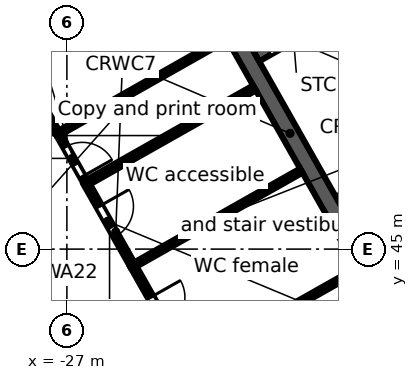
"""IFC4 building model, lengths in metres.
Left out: names, types, materials, properties, quantities, classifications, styles, units other than length and angle.
Written with IfcOpenShell. Run it as: python <this file> out.ifc"""

import sys

from ifc_helpers import new_model, si_unit, direction, frame, frame_2d, origin, place, context, subcontext, project, spatial, rectangle, extrude, element, fill, save


model = new_model("IFC4")
c1 = context("Model", 3, precision=1e-05, world=origin(), true_north=direction((0.0, 1.0)))
c2 = subcontext(c1, "Body", "Model", "MODEL_VIEW")
j1 = project(units=[si_unit("LENGTHUNIT", "METRE"), si_unit("PLANEANGLEUNIT", "RADIAN")], contexts=[c1])
p1 = place(None, origin())
s1 = spatial("IfcSite", under=j1, at=p1, CompositionType="ELEMENT")
p2 = place(p1, origin())
s2 = spatial("IfcBuilding", under=s1, at=p2, CompositionType="ELEMENT")
p3 = place(p2, frame((0.0, 0.0, 223.1)))
s3 = spatial("IfcBuildingStorey", under=s2, at=p3, CompositionType="ELEMENT", Elevation=223.1)
p4 = place(p3, frame((-0.046, 47.974, 0.0), z_axis=(0.0, 0.0, 1.0), x_axis=(-0.870356579543, -0.492421998337, 0.0)))
e1 = element("IfcWall", 1, at=p4, inside=s3, PredefinedType="STANDARD", context=c2, shape_type="SweptSolid", body=[
    extrude(rectangle(XDim=43.754, YDim=0.25, at=frame_2d((21.877, 0.0))), origin(), (0.0, 0.0, 1.0), 3.62),
])
p5 = place(p4, frame((41.061, 0.0, 0.8)))
e2 = element("IfcOpeningElement", 2, at=p5, cuts=e1, PredefinedType="OPENING", context=c2, shape_type="SweptSolid", body=[
    extrude(rectangle(XDim=2.4, YDim=2.2, at=frame_2d((1.2, 1.1))), frame((0.0, 0.135, 0.0), z_axis=(0.0, -1.0, 0.0), x_axis=(1.0, 0.0, 0.0)), (0.0, 0.0, 1.0), 0.27),
])
p6 = place(p4, frame((38.443, 0.0, 0.0)))
e3 = element("IfcOpeningElement", 3, at=p6, cuts=e1, PredefinedType="OPENING", context=c2, shape_type="SweptSolid", body=[
    extrude(rectangle(XDim=1.8, YDim=2.4, at=frame_2d((0.9, 1.2))), frame((0.0, 0.135, 0.0), z_axis=(0.0, -1.0, 0.0), x_axis=(1.0, 0.0, 0.0)), (0.0, 0.0, 1.0), 0.27),
])
p7 = place(p4, frame((35.225, 0.0, 0.8)))
e4 = element("IfcOpeningElement", 4, at=p7, cuts=e1, PredefinedType="OPENING", context=c2, shape_type="SweptSolid", body=[
    extrude(rectangle(XDim=2.4, YDim=2.2, at=frame_2d((1.2, 1.1))), frame((0.0, 0.135, 0.0), z_axis=(0.0, -1.0, 0.0), x_axis=(1.0, 0.0, 0.0)), (0.0, 0.0, 1.0), 0.27),
])
p8 = place(p4, frame((32.307, 0.0, 0.8)))
e5 = element("IfcOpeningElement", 5, at=p8, cuts=e1, PredefinedType="OPENING", context=c2, shape_type="SweptSolid", body=[
    extrude(rectangle(XDim=2.4, YDim=2.2, at=frame_2d((1.2, 1.1))), frame((0.0, 0.135, 0.0), z_axis=(0.0, -1.0, 0.0), x_axis=(1.0, 0.0, 0.0)), (0.0, 0.0, 1.0), 0.27),
])
p9 = place(p4, frame((29.688, 0.0, 0.0)))
e6 = element("IfcOpeningElement", 6, at=p9, cuts=e1, PredefinedType="OPENING", context=c2, shape_type="SweptSolid", body=[
    extrude(rectangle(XDim=1.8, YDim=2.4, at=frame_2d((0.9, 1.2))), frame((0.0, 0.135, 0.0), z_axis=(0.0, -1.0, 0.0), x_axis=(1.0, 0.0, 0.0)), (0.0, 0.0, 1.0), 0.27),
])
p10 = place(p4, frame((26.47, 0.0, 0.8)))
e7 = element("IfcOpeningElement", 7, at=p10, cuts=e1, PredefinedType="OPENING", context=c2, shape_type="SweptSolid", body=[
    extrude(rectangle(XDim=2.4, YDim=2.2, at=frame_2d((1.2, 1.1))), frame((0.0, 0.135, 0.0), z_axis=(0.0, -1.0, 0.0), x_axis=(1.0, 0.0, 0.0)), (0.0, 0.0, 1.0), 0.27),
])
p11 = place(p4, frame((23.552, 0.0, 0.8)))
e8 = element("IfcOpeningElement", 8, at=p11, cuts=e1, PredefinedType="OPENING", context=c2, shape_type="SweptSolid", body=[
    extrude(rectangle(XDim=2.4, YDim=2.2, at=frame_2d((1.2, 1.1))), frame((0.0, 0.135, 0.0), z_axis=(0.0, -1.0, 0.0), x_axis=(1.0, 0.0, 0.0)), (0.0, 0.0, 1.0), 0.27),
])
p12 = place(p4, frame((20.934, 0.0, 0.0)))
e9 = element("IfcOpeningElement", 9, at=p12, cuts=e1, PredefinedType="OPENING", context=c2, shape_type="SweptSolid", body=[
    extrude(rectangle(XDim=1.8, YDim=2.4, at=frame_2d((0.9, 1.2))), frame((0.0, 0.135, 0.0), z_axis=(0.0, -1.0, 0.0), x_axis=(1.0, 0.0, 0.0)), (0.0, 0.0, 1.0), 0.27),
])
p13 = place(p4, frame((17.716, 0.0, 0.8)))
e10 = element("IfcOpeningElement", 10, at=p13, cuts=e1, PredefinedType="OPENING", context=c2, shape_type="SweptSolid", body=[
    extrude(rectangle(XDim=2.4, YDim=2.2, at=frame_2d((1.2, 1.1))), frame((0.0, 0.135, 0.0), z_axis=(0.0, -1.0, 0.0), x_axis=(1.0, 0.0, 0.0)), (0.0, 0.0, 1.0), 0.27),
])
p14 = place(p4, frame((14.798, 0.0, 0.8)))
e11 = element("IfcOpeningElement", 11, at=p14, cuts=e1, PredefinedType="OPENING", context=c2, shape_type="SweptSolid", body=[
    extrude(rectangle(XDim=2.4, YDim=2.2, at=frame_2d((1.2, 1.1))), frame((0.0, 0.135, 0.0), z_axis=(0.0, -1.0, 0.0), x_axis=(1.0, 0.0, 0.0)), (0.0, 0.0, 1.0), 0.27),
])
p15 = place(p4, frame((12.179, 0.0, 0.0)))
e12 = element("IfcOpeningElement", 12, at=p15, cuts=e1, PredefinedType="OPENING", context=c2, shape_type="SweptSolid", body=[
    extrude(rectangle(XDim=1.8, YDim=2.4, at=frame_2d((0.9, 1.2))), frame((0.0, 0.135, 0.0), z_axis=(0.0, -1.0, 0.0), x_axis=(1.0, 0.0, 0.0)), (0.0, 0.0, 1.0), 0.27),
])
p16 = place(p4, frame((8.961, 0.0, 0.8)))
e13 = element("IfcOpeningElement", 13, at=p16, cuts=e1, PredefinedType="OPENING", context=c2, shape_type="SweptSolid", body=[
    extrude(rectangle(XDim=2.4, YDim=2.2, at=frame_2d((1.2, 1.1))), frame((0.0, 0.135, 0.0), z_axis=(0.0, -1.0, 0.0), x_axis=(1.0, 0.0, 0.0)), (0.0, 0.0, 1.0), 0.27),
])
p17 = place(p4, frame((6.043, 0.0, 0.8)))
e14 = element("IfcOpeningElement", 14, at=p17, cuts=e1, PredefinedType="OPENING", context=c2, shape_type="SweptSolid", body=[
    extrude(rectangle(XDim=2.4, YDim=2.2, at=frame_2d((1.2, 1.1))), frame((0.0, 0.135, 0.0), z_axis=(0.0, -1.0, 0.0), x_axis=(1.0, 0.0, 0.0)), (0.0, 0.0, 1.0), 0.27),
])
p18 = place(p4, frame((3.425, 0.0, 0.0)))
e15 = element("IfcOpeningElement", 15, at=p18, cuts=e1, PredefinedType="OPENING", context=c2, shape_type="SweptSolid", body=[
    extrude(rectangle(XDim=1.8, YDim=2.4, at=frame_2d((0.9, 1.2))), frame((0.0, 0.135, 0.0), z_axis=(0.0, -1.0, 0.0), x_axis=(1.0, 0.0, 0.0)), (0.0, 0.0, 1.0), 0.27),
])
p19 = place(p4, frame((0.207, 0.0, 0.8)))
e16 = element("IfcOpeningElement", 16, at=p19, cuts=e1, PredefinedType="OPENING", context=c2, shape_type="SweptSolid", body=[
    extrude(rectangle(XDim=2.4, YDim=2.2, at=frame_2d((1.2, 1.1))), frame((0.0, 0.135, 0.0), z_axis=(0.0, -1.0, 0.0), x_axis=(1.0, 0.0, 0.0)), (0.0, 0.0, 1.0), 0.27),
])
p20 = place(p3, frame((-58.732, 38.771, 0.0), z_axis=(0.0, 0.0, 1.0), x_axis=(0.870354824205, 0.492425100887, 0.0)))
e17 = element("IfcWall", 17, at=p20, inside=s3, PredefinedType="STANDARD", context=c2, shape_type="SweptSolid", body=[
    extrude(rectangle(XDim=64.006, YDim=0.25, at=frame_2d((32.003, 0.0))), origin(), (0.0, 0.0, 1.0), 3.62),
])
p21 = place(p20, frame((61.259, 0.0, 0.8)))
e18 = element("IfcOpeningElement", 18, at=p21, cuts=e17, PredefinedType="OPENING", context=c2, shape_type="SweptSolid", body=[
    extrude(rectangle(XDim=2.4, YDim=2.2, at=frame_2d((1.2, 1.1))), frame((0.0, 0.135, 0.0), z_axis=(0.0, -1.0, 0.0), x_axis=(1.0, 0.0, 0.0)), (0.0, 0.0, 1.0), 0.27),
])
p22 = place(p20, frame((58.216, 0.0, 0.8)))
e19 = element("IfcOpeningElement", 19, at=p22, cuts=e17, PredefinedType="OPENING", context=c2, shape_type="SweptSolid", body=[
    extrude(rectangle(XDim=2.4, YDim=2.2, at=frame_2d((1.2, 1.1))), frame((0.0, 0.135, 0.0), z_axis=(0.0, -1.0, 0.0), x_axis=(1.0, 0.0, 0.0)), (0.0, 0.0, 1.0), 0.27),
])
p23 = place(p20, frame((55.173, 0.0, 0.8)))
e20 = element("IfcOpeningElement", 20, at=p23, cuts=e17, PredefinedType="OPENING", context=c2, shape_type="SweptSolid", body=[
    extrude(rectangle(XDim=2.4, YDim=2.2, at=frame_2d((1.2, 1.1))), frame((0.0, 0.135, 0.0), z_axis=(0.0, -1.0, 0.0), x_axis=(1.0, 0.0, 0.0)), (0.0, 0.0, 1.0), 0.27),
])
p24 = place(p20, frame((52.129, 0.0, 0.8)))
e21 = element("IfcOpeningElement", 21, at=p24, cuts=e17, PredefinedType="OPENING", context=c2, shape_type="SweptSolid", body=[
    extrude(rectangle(XDim=2.4, YDim=2.2, at=frame_2d((1.2, 1.1))), frame((0.0, 0.135, 0.0), z_axis=(0.0, -1.0, 0.0), x_axis=(1.0, 0.0, 0.0)), (0.0, 0.0, 1.0), 0.27),
])
p25 = place(p20, frame((49.086, 0.0, 0.8)))
e22 = element("IfcOpeningElement", 22, at=p25, cuts=e17, PredefinedType="OPENING", context=c2, shape_type="SweptSolid", body=[
    extrude(rectangle(XDim=2.4, YDim=2.2, at=frame_2d((1.2, 1.1))), frame((0.0, 0.135, 0.0), z_axis=(0.0, -1.0, 0.0), x_axis=(1.0, 0.0, 0.0)), (0.0, 0.0, 1.0), 0.27),
])
p26 = place(p20, frame((46.043, 0.0, 0.8)))
e23 = element("IfcOpeningElement", 23, at=p26, cuts=e17, PredefinedType="OPENING", context=c2, shape_type="SweptSolid", body=[
    extrude(rectangle(XDim=2.4, YDim=2.2, at=frame_2d((1.2, 1.1))), frame((0.0, 0.135, 0.0), z_axis=(0.0, -1.0, 0.0), x_axis=(1.0, 0.0, 0.0)), (0.0, 0.0, 1.0), 0.27),
])
p27 = place(p20, frame((43.0, 0.0, 0.8)))
e24 = element("IfcOpeningElement", 24, at=p27, cuts=e17, PredefinedType="OPENING", context=c2, shape_type="SweptSolid", body=[
    extrude(rectangle(XDim=2.4, YDim=2.2, at=frame_2d((1.2, 1.1))), frame((0.0, 0.135, 0.0), z_axis=(0.0, -1.0, 0.0), x_axis=(1.0, 0.0, 0.0)), (0.0, 0.0, 1.0), 0.27),
])
p28 = place(p20, frame((39.956, 0.0, 0.8)))
e25 = element("IfcOpeningElement", 25, at=p28, cuts=e17, PredefinedType="OPENING", context=c2, shape_type="SweptSolid", body=[
    extrude(rectangle(XDim=2.4, YDim=2.2, at=frame_2d((1.2, 1.1))), frame((0.0, 0.135, 0.0), z_axis=(0.0, -1.0, 0.0), x_axis=(1.0, 0.0, 0.0)), (0.0, 0.0, 1.0), 0.27),
])
p29 = place(p20, frame((36.913, 0.0, 0.8)))
e26 = element("IfcOpeningElement", 26, at=p29, cuts=e17, PredefinedType="OPENING", context=c2, shape_type="SweptSolid", body=[
    extrude(rectangle(XDim=2.4, YDim=2.2, at=frame_2d((1.2, 1.1))), frame((0.0, 0.135, 0.0), z_axis=(0.0, -1.0, 0.0), x_axis=(1.0, 0.0, 0.0)), (0.0, 0.0, 1.0), 0.27),
])
p30 = place(p20, frame((33.87, 0.0, 0.8)))
e27 = element("IfcOpeningElement", 27, at=p30, cuts=e17, PredefinedType="OPENING", context=c2, shape_type="SweptSolid", body=[
    extrude(rectangle(XDim=2.4, YDim=2.2, at=frame_2d((1.2, 1.1))), frame((0.0, 0.135, 0.0), z_axis=(0.0, -1.0, 0.0), x_axis=(1.0, 0.0, 0.0)), (0.0, 0.0, 1.0), 0.27),
])
p31 = place(p20, frame((30.826, 0.0, 0.8)))
e28 = element("IfcOpeningElement", 28, at=p31, cuts=e17, PredefinedType="OPENING", context=c2, shape_type="SweptSolid", body=[
    extrude(rectangle(XDim=2.4, YDim=2.2, at=frame_2d((1.2, 1.1))), frame((0.0, 0.135, 0.0), z_axis=(0.0, -1.0, 0.0), x_axis=(1.0, 0.0, 0.0)), (0.0, 0.0, 1.0), 0.27),
])
p32 = place(p20, frame((27.783, 0.0, 0.8)))
e29 = element("IfcOpeningElement", 29, at=p32, cuts=e17, PredefinedType="OPENING", context=c2, shape_type="SweptSolid", body=[
    extrude(rectangle(XDim=2.4, YDim=2.2, at=frame_2d((1.2, 1.1))), frame((0.0, 0.135, 0.0), z_axis=(0.0, -1.0, 0.0), x_axis=(1.0, 0.0, 0.0)), (0.0, 0.0, 1.0), 0.27),
])
p33 = place(p20, frame((24.74, 0.0, 0.8)))
e30 = element("IfcOpeningElement", 30, at=p33, cuts=e17, PredefinedType="OPENING", context=c2, shape_type="SweptSolid", body=[
    extrude(rectangle(XDim=2.4, YDim=2.2, at=frame_2d((1.2, 1.1))), frame((0.0, 0.135, 0.0), z_axis=(0.0, -1.0, 0.0), x_axis=(1.0, 0.0, 0.0)), (0.0, 0.0, 1.0), 0.27),
])
p34 = place(p20, frame((21.696, 0.0, 0.8)))
e31 = element("IfcOpeningElement", 31, at=p34, cuts=e17, PredefinedType="OPENING", context=c2, shape_type="SweptSolid", body=[
    extrude(rectangle(XDim=2.4, YDim=2.2, at=frame_2d((1.2, 1.1))), frame((0.0, 0.135, 0.0), z_axis=(0.0, -1.0, 0.0), x_axis=(1.0, 0.0, 0.0)), (0.0, 0.0, 1.0), 0.27),
])
p35 = place(p20, frame((18.653, 0.0, 0.8)))
e32 = element("IfcOpeningElement", 32, at=p35, cuts=e17, PredefinedType="OPENING", context=c2, shape_type="SweptSolid", body=[
    extrude(rectangle(XDim=2.4, YDim=2.2, at=frame_2d((1.2, 1.1))), frame((0.0, 0.135, 0.0), z_axis=(0.0, -1.0, 0.0), x_axis=(1.0, 0.0, 0.0)), (0.0, 0.0, 1.0), 0.27),
])
p36 = place(p20, frame((15.61, 0.0, 0.8)))
e33 = element("IfcOpeningElement", 33, at=p36, cuts=e17, PredefinedType="OPENING", context=c2, shape_type="SweptSolid", body=[
    extrude(rectangle(XDim=2.4, YDim=2.2, at=frame_2d((1.2, 1.1))), frame((0.0, 0.135, 0.0), z_axis=(0.0, -1.0, 0.0), x_axis=(1.0, 0.0, 0.0)), (0.0, 0.0, 1.0), 0.27),
])
p37 = place(p20, frame((12.567, 0.0, 0.8)))
e34 = element("IfcOpeningElement", 34, at=p37, cuts=e17, PredefinedType="OPENING", context=c2, shape_type="SweptSolid", body=[
    extrude(rectangle(XDim=2.4, YDim=2.2, at=frame_2d((1.2, 1.1))), frame((0.0, 0.135, 0.0), z_axis=(0.0, -1.0, 0.0), x_axis=(1.0, 0.0, 0.0)), (0.0, 0.0, 1.0), 0.27),
])
p38 = place(p20, frame((9.523, 0.0, 0.8)))
e35 = element("IfcOpeningElement", 35, at=p38, cuts=e17, PredefinedType="OPENING", context=c2, shape_type="SweptSolid", body=[
    extrude(rectangle(XDim=2.4, YDim=2.2, at=frame_2d((1.2, 1.1))), frame((0.0, 0.135, 0.0), z_axis=(0.0, -1.0, 0.0), x_axis=(1.0, 0.0, 0.0)), (0.0, 0.0, 1.0), 0.27),
])
p39 = place(p20, frame((6.48, 0.0, 0.8)))
e36 = element("IfcOpeningElement", 36, at=p39, cuts=e17, PredefinedType="OPENING", context=c2, shape_type="SweptSolid", body=[
    extrude(rectangle(XDim=2.4, YDim=2.2, at=frame_2d((1.2, 1.1))), frame((0.0, 0.135, 0.0), z_axis=(0.0, -1.0, 0.0), x_axis=(1.0, 0.0, 0.0)), (0.0, 0.0, 1.0), 0.27),
])
p40 = place(p20, frame((3.437, 0.0, 0.8)))
e37 = element("IfcOpeningElement", 37, at=p40, cuts=e17, PredefinedType="OPENING", context=c2, shape_type="SweptSolid", body=[
    extrude(rectangle(XDim=2.4, YDim=2.2, at=frame_2d((1.2, 1.1))), frame((0.0, 0.135, 0.0), z_axis=(0.0, -1.0, 0.0), x_axis=(1.0, 0.0, 0.0)), (0.0, 0.0, 1.0), 0.27),
])
p41 = place(p20, frame((0.393, 0.0, 0.8)))
e38 = element("IfcOpeningElement", 38, at=p41, cuts=e17, PredefinedType="OPENING", context=c2, shape_type="SweptSolid", body=[
    extrude(rectangle(XDim=2.4, YDim=2.2, at=frame_2d((1.2, 1.1))), frame((0.0, 0.135, 0.0), z_axis=(0.0, -1.0, 0.0), x_axis=(1.0, 0.0, 0.0)), (0.0, 0.0, 1.0), 0.27),
])
p42 = place(p3, frame((-31.787, 49.542, 0.0), z_axis=(0.0, 0.0, 1.0), x_axis=(0.492421378713, -0.870356930107, 0.0)))
e39 = element("IfcWall", 39, at=p42, inside=s3, PredefinedType="SOLIDWALL", context=c2, shape_type="SweptSolid", body=[
    extrude(rectangle(XDim=13.1, YDim=0.45, at=frame_2d((6.55, 0.0))), origin(), (0.0, 0.0, 1.0), 3.62),
])
p43 = place(p3, frame((-19.849, 46.242, 0.0), z_axis=(0.0, 0.0, 1.0), x_axis=(0.870347559728, 0.492437940532, 0.0)))
e40 = element("IfcWall", 40, at=p43, inside=s3, PredefinedType="SOLIDWALL", context=c2, shape_type="SweptSolid", body=[
    extrude(rectangle(XDim=5.05, YDim=0.3, at=frame_2d((2.525, 0.0))), origin(), (0.0, 0.0, 1.0), 3.62),
])
p44 = place(p43, frame((0.7, 0.0, 0.0)))
e41 = element("IfcOpeningElement", 41, at=p44, cuts=e40, PredefinedType="OPENING", context=c2, shape_type="SweptSolid", body=[
    extrude(rectangle(XDim=1.1, YDim=2.1, at=frame_2d((0.55, 1.05))), frame((0.0, 0.16, 0.0), z_axis=(0.0, -1.0, 0.0), x_axis=(1.0, 0.0, 0.0)), (0.0, 0.0, 1.0), 0.32),
])
p45 = place(p43, frame((3.8, 0.0, 0.0)))
e42 = element("IfcOpeningElement", 42, at=p45, cuts=e40, PredefinedType="OPENING", context=c2, shape_type="SweptSolid", body=[
    extrude(rectangle(XDim=0.9, YDim=2.1, at=frame_2d((0.45, 1.05))), frame((0.0, 0.16, 0.0), z_axis=(0.0, -1.0, 0.0), x_axis=(1.0, 0.0, 0.0)), (0.0, 0.0, 1.0), 0.32),
])
p46 = place(p3, frame((-22.015, 50.072, 0.0), z_axis=(0.0, 0.0, 1.0), x_axis=(0.870354900257, 0.492424966466, 0.0)))
e43 = element("IfcWall", 43, at=p46, inside=s3, PredefinedType="SOLIDWALL", context=c2, shape_type="SweptSolid", body=[
    extrude(rectangle(XDim=7.35, YDim=0.3, at=frame_2d((3.675, 0.0))), origin(), (0.0, 0.0, 1.0), 3.62),
])
p47 = place(p46, frame((0.35, 0.0, 0.0)))
e44 = element("IfcOpeningElement", 44, at=p47, cuts=e43, PredefinedType="OPENING", context=c2, shape_type="SweptSolid", body=[
    extrude(rectangle(XDim=1.0, YDim=2.1, at=frame_2d((0.5, 1.05))), frame((0.0, 0.16, 0.0), z_axis=(0.0, -1.0, 0.0), x_axis=(1.0, 0.0, 0.0)), (0.0, 0.0, 1.0), 0.32),
])
p48 = place(p3, frame((-24.353, 53.747, 0.0), z_axis=(0.0, 0.0, 1.0), x_axis=(0.492435496286, -0.870348942665, 0.0)))
e45 = element("IfcWall", 45, at=p48, inside=s3, PredefinedType="SOLIDWALL", context=c2, shape_type="SweptSolid", body=[
    extrude(rectangle(XDim=13.1, YDim=0.45, at=frame_2d((6.55, 0.0))), origin(), (0.0, 0.0, 1.0), 3.62),
])
p49 = place(p3, frame((-29.201, 51.521, 0.0), z_axis=(0.0, 0.0, 1.0), x_axis=(0.492340861121, -0.870402479587, 0.0)))
e46 = element("IfcWall", 46, at=p49, inside=s3, PredefinedType="PARTITIONING", context=c2, shape_type="SweptSolid", body=[
    extrude(rectangle(XDim=3.999, YDim=0.125, at=frame_2d((2.0, 0.0))), origin(), (0.0, 0.0, 1.0), 3.62),
])
p50 = place(p49, frame((1.45, 0.0, 0.0)))
e47 = element("IfcOpeningElement", 47, at=p50, cuts=e46, PredefinedType="OPENING", context=c2, shape_type="SweptSolid", body=[
    extrude(rectangle(XDim=0.9, YDim=2.1, at=frame_2d((0.45, 1.05))), frame((0.0, 0.073, 0.0), z_axis=(0.0, -1.0, 0.0), x_axis=(1.0, 0.0, 0.0)), (0.0, 0.0, 1.0), 0.145),
])
p51 = place(p3, frame((-27.232, 48.04, 0.0), z_axis=(0.0, 0.0, 1.0), x_axis=(0.492437810475, -0.870347633314, 0.0)))
e48 = element("IfcWall", 48, at=p51, inside=s3, PredefinedType="PARTITIONING", context=c2, shape_type="SweptSolid", body=[
    extrude(rectangle(XDim=1.501, YDim=0.125, at=frame_2d((0.75, 0.0))), origin(), (0.0, 0.0, 1.0), 3.62),
])
p52 = place(p51, frame((0.4, 0.0, 0.0)))
e49 = element("IfcOpeningElement", 49, at=p52, cuts=e48, PredefinedType="OPENING", context=c2, shape_type="SweptSolid", body=[
    extrude(rectangle(XDim=0.9, YDim=2.1, at=frame_2d((0.45, 1.05))), frame((0.0, 0.073, 0.0), z_axis=(0.0, -1.0, 0.0), x_axis=(1.0, 0.0, 0.0)), (0.0, 0.0, 1.0), 0.145),
])
p53 = place(p3, frame((-27.232, 48.04, 0.0), z_axis=(0.0, 0.0, 1.0), x_axis=(0.870339461844, 0.492452252668, 0.0)))
e50 = element("IfcWall", 50, at=p53, inside=s3, PredefinedType="PARTITIONING", context=c2, shape_type="SweptSolid", body=[
    extrude(rectangle(XDim=5.091, YDim=0.125, at=frame_2d((2.545, 0.0))), origin(), (0.0, 0.0, 1.0), 2.892),
])
p54 = place(p3, frame((-26.493, 46.734, 0.0), z_axis=(0.0, 0.0, 1.0), x_axis=(0.49257867544, -0.870267917656, 0.0)))
e51 = element("IfcWall", 51, at=p54, inside=s3, PredefinedType="PARTITIONING", context=c2, shape_type="SweptSolid", body=[
    extrude(rectangle(XDim=2.499, YDim=0.15, at=frame_2d((1.25, 0.0))), origin(), (0.0, 0.0, 1.0), 2.892),
])
p55 = place(p54, frame((0.7, 0.0, 0.0)))
e52 = element("IfcOpeningElement", 52, at=p55, cuts=e51, PredefinedType="OPENING", context=c2, shape_type="SweptSolid", body=[
    extrude(rectangle(XDim=0.9, YDim=2.1, at=frame_2d((0.45, 1.05))), frame((0.0, 0.085, 0.0), z_axis=(0.0, -1.0, 0.0), x_axis=(1.0, 0.0, 0.0)), (0.0, 0.0, 1.0), 0.17),
])
p56 = place(p3, frame((-26.493, 46.734, 0.0), z_axis=(0.0, 0.0, 1.0), x_axis=(0.870339461844, 0.492452252668, 0.0)))
e53 = element("IfcWall", 53, at=p56, inside=s3, PredefinedType="PARTITIONING", context=c2, shape_type="SweptSolid", body=[
    extrude(rectangle(XDim=5.091, YDim=0.15, at=frame_2d((2.545, 0.0))), origin(), (0.0, 0.0, 1.0), 2.892),
])
p57 = place(p3, frame((-25.262, 44.559, 0.0), z_axis=(0.0, 0.0, 1.0), x_axis=(0.492226144536, -0.870467358742, 0.0)))
e54 = element("IfcWall", 54, at=p57, inside=s3, PredefinedType="PARTITIONING", context=c2, shape_type="SweptSolid", body=[
    extrude(rectangle(XDim=3.001, YDim=0.15, at=frame_2d((1.5, 0.0))), origin(), (0.0, 0.0, 1.0), 3.62),
])
p58 = place(p57, frame((0.95, 0.0, 0.0)))
e55 = element("IfcOpeningElement", 55, at=p58, cuts=e54, PredefinedType="OPENING", context=c2, shape_type="SweptSolid", body=[
    extrude(rectangle(XDim=0.9, YDim=2.1, at=frame_2d((0.45, 1.05))), frame((0.0, 0.085, 0.0), z_axis=(0.0, -1.0, 0.0), x_axis=(1.0, 0.0, 0.0)), (0.0, 0.0, 1.0), 0.17),
])
p59 = place(p3, frame((-25.262, 44.559, 0.0), z_axis=(0.0, 0.0, 1.0), x_axis=(0.870442223229, 0.492270592276, 0.0)))
e56 = element("IfcWall", 56, at=p59, inside=s3, PredefinedType="PARTITIONING", context=c2, shape_type="SweptSolid", body=[
    extrude(rectangle(XDim=5.09, YDim=0.125, at=frame_2d((2.545, 0.0))), origin(), (0.0, 0.0, 1.0), 3.62),
])
p60 = place(p3, frame((-23.785, 41.947, 0.0), z_axis=(0.0, 0.0, 1.0), x_axis=(0.870339461844, 0.492452252668, 0.0)))
e57 = element("IfcWall", 57, at=p60, inside=s3, PredefinedType="PARTITIONING", context=c2, shape_type="SweptSolid", body=[
    extrude(rectangle(XDim=5.091, YDim=0.125, at=frame_2d((2.545, 0.0))), origin(), (0.0, 0.0, 1.0), 3.62),
])
p61 = place(p58, origin())
e58 = element("IfcDoor", 58, at=p61, inside=s3, OperationType="SINGLE_SWING_LEFT", PredefinedType="DOOR", context=c2, shape_type="SweptSolid", body=[
    extrude(rectangle(XDim=0.9, YDim=2.1, at=frame_2d((0.45, 1.05))), frame((0.0, 0.025, 0.0), z_axis=(0.0, -1.0, 0.0), x_axis=(1.0, 0.0, 0.0)), (0.0, 0.0, 1.0), 0.05),
])
fill(e55, e58)
p62 = place(p55, origin())
e59 = element("IfcDoor", 59, at=p62, inside=s3, OperationType="SINGLE_SWING_LEFT", PredefinedType="DOOR", context=c2, shape_type="SweptSolid", body=[
    extrude(rectangle(XDim=0.9, YDim=2.1, at=frame_2d((0.45, 1.05))), frame((0.0, 0.025, 0.0), z_axis=(0.0, -1.0, 0.0), x_axis=(1.0, 0.0, 0.0)), (0.0, 0.0, 1.0), 0.05),
])
fill(e52, e59)
p63 = place(p52, origin())
e60 = element("IfcDoor", 60, at=p63, inside=s3, OperationType="SINGLE_SWING_RIGHT", PredefinedType="DOOR", context=c2, shape_type="SweptSolid", body=[
    extrude(rectangle(XDim=0.9, YDim=2.1, at=frame_2d((0.45, 1.05))), frame((0.0, 0.025, 0.0), z_axis=(0.0, -1.0, 0.0), x_axis=(1.0, 0.0, 0.0)), (0.0, 0.0, 1.0), 0.05),
])
fill(e49, e60)
save(model, sys.argv[1])
